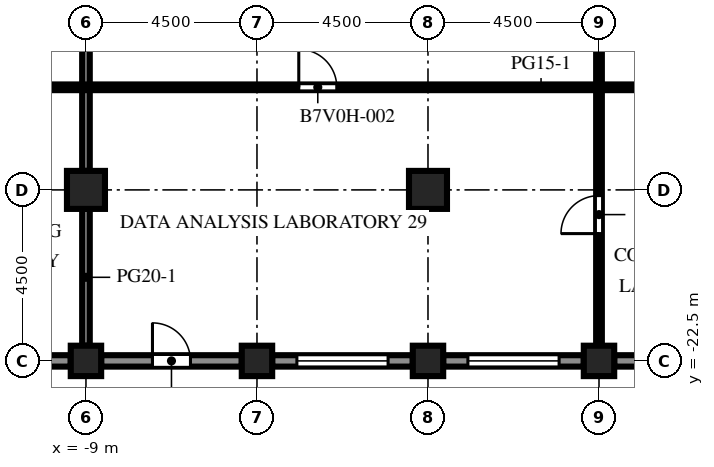
"""IFC4 building model, lengths in metres.
Left out: names, types, materials, properties, quantities, classifications, styles, units other than length and angle.
Written with IfcOpenShell. Run it as: python <this file> out.ifc"""

import sys

from ifc_helpers import new_model, si_unit, direction, frame, frame_2d, origin, origin_2d, place, context, subcontext, project, spatial, rectangle, extrude, element, fill, save


model = new_model("IFC4")
c1 = context("Model", 3, precision=1e-05, world=origin(), true_north=direction((0.0, 1.0)))
c2 = subcontext(c1, "Body", "Model", "MODEL_VIEW")
j1 = project(units=[si_unit("LENGTHUNIT", "METRE"), si_unit("PLANEANGLEUNIT", "RADIAN")], contexts=[c1])
p1 = place(None, origin())
s1 = spatial("IfcSite", under=j1, at=p1, CompositionType="ELEMENT")
p2 = place(p1, origin())
s2 = spatial("IfcBuilding", under=s1, at=p2, CompositionType="ELEMENT")
p3 = place(p2, frame((0.0, 0.0, 231.6)))
s3 = spatial("IfcBuildingStorey", under=s2, at=p3, CompositionType="ELEMENT", Elevation=231.6)
for number, where, z_axis, x_axis in (
    (1, (-9.0, -22.5, 0.0), (0.0, 0.0, 1.0), (1.0, 0.0, 0.0)),
    (2, (-4.5, -22.5, 0.0), (0.0, 0.0, 1.0), (1.0, 0.0, 0.0)),
    (3, (0.0, -22.5, 0.0), (0.0, 0.0, 1.0), (1.0, 0.0, 0.0)),
    (4, (4.5, -22.5, 0.0), (0.0, 0.0, 1.0), (1.0, 0.0, 0.0)),
):
    element("IfcColumn", number, at=place(p3, frame(where, z_axis=z_axis, x_axis=x_axis)), inside=s3, PredefinedType="COLUMN", context=c2, shape_type="SweptSolid", body=[
        extrude(rectangle(XDim=0.8, YDim=0.8, at=origin_2d()), origin(), (0.0, 0.0, 1.0), 4.1),
    ])
for number, where, z_axis, x_axis in (
    (5, (-9.0, -18.0, 0.0), (0.0, 0.0, 1.0), (1.0, 0.0, 0.0)),
    (6, (0.0, -18.0, 0.0), (0.0, 0.0, 1.0), (1.0, 0.0, 0.0)),
):
    element("IfcColumn", number, at=place(p3, frame(where, z_axis=z_axis, x_axis=x_axis)), inside=s3, PredefinedType="COLUMN", context=c2, shape_type="SweptSolid", body=[
        extrude(rectangle(XDim=1.0, YDim=1.0, at=origin_2d()), origin(), (0.0, 0.0, 1.0), 4.1),
    ])
p4 = place(p3, frame((-9.4, -22.5, 0.0), z_axis=(0.0, 0.0, 1.0), x_axis=(-1.0, 0.0, 0.0)))
e7 = element("IfcWall", 7, at=p4, inside=s3, PredefinedType="SOLIDWALL", context=c2, shape_type="SweptSolid", body=[
    extrude(rectangle(XDim=3.7, YDim=0.3, at=frame_2d((1.85, 0.0))), origin(), (0.0, 0.0, 1.0), 2.85),
])
p5 = place(p4, frame((0.65, 0.0, 0.8)))
e8 = element("IfcOpeningElement", 8, at=p5, cuts=e7, PredefinedType="OPENING", context=c2, shape_type="SweptSolid", body=[
    extrude(rectangle(XDim=2.4, YDim=1.7, at=frame_2d((1.2, 0.85))), frame((0.0, 0.16, 0.0), z_axis=(0.0, -1.0, 0.0), x_axis=(1.0, 0.0, 0.0)), (0.0, 0.0, 1.0), 0.32),
])
p6 = place(p3, frame((-4.9, -22.5, 0.0), z_axis=(0.0, 0.0, 1.0), x_axis=(-1.0, 0.0, 0.0)))
e9 = element("IfcWall", 9, at=p6, inside=s3, PredefinedType="SOLIDWALL", context=c2, shape_type="SweptSolid", body=[
    extrude(rectangle(XDim=3.7, YDim=0.3, at=frame_2d((1.85, 0.0))), origin(), (0.0, 0.0, 1.0), 2.85),
])
p7 = place(p6, frame((1.35, 0.0, 0.0)))
e10 = element("IfcOpeningElement", 10, at=p7, cuts=e9, PredefinedType="OPENING", context=c2, shape_type="SweptSolid", body=[
    extrude(rectangle(XDim=1.0, YDim=2.2, at=frame_2d((0.5, 1.1))), frame((0.0, 0.16, 0.0), z_axis=(0.0, -1.0, 0.0), x_axis=(1.0, 0.0, 0.0)), (0.0, 0.0, 1.0), 0.32),
])
p8 = place(p3, frame((-0.4, -22.5, 0.0), z_axis=(0.0, 0.0, 1.0), x_axis=(-1.0, 0.0, 0.0)))
e11 = element("IfcWall", 11, at=p8, inside=s3, PredefinedType="SOLIDWALL", context=c2, shape_type="SweptSolid", body=[
    extrude(rectangle(XDim=3.7, YDim=0.3, at=frame_2d((1.85, 0.0))), origin(), (0.0, 0.0, 1.0), 2.85),
])
p9 = place(p8, frame((0.65, 0.0, 0.8)))
e12 = element("IfcOpeningElement", 12, at=p9, cuts=e11, PredefinedType="OPENING", context=c2, shape_type="SweptSolid", body=[
    extrude(rectangle(XDim=2.4, YDim=1.7, at=frame_2d((1.2, 0.85))), frame((0.0, 0.16, 0.0), z_axis=(0.0, -1.0, 0.0), x_axis=(1.0, 0.0, 0.0)), (0.0, 0.0, 1.0), 0.32),
])
p10 = place(p3, frame((4.1, -22.5, 0.0), z_axis=(0.0, 0.0, 1.0), x_axis=(-1.0, 0.0, 0.0)))
e13 = element("IfcWall", 13, at=p10, inside=s3, PredefinedType="SOLIDWALL", context=c2, shape_type="SweptSolid", body=[
    extrude(rectangle(XDim=3.7, YDim=0.3, at=frame_2d((1.85, 0.0))), origin(), (0.0, 0.0, 1.0), 2.85),
])
p11 = place(p10, frame((0.65, 0.0, 0.8)))
e14 = element("IfcOpeningElement", 14, at=p11, cuts=e13, PredefinedType="OPENING", context=c2, shape_type="SweptSolid", body=[
    extrude(rectangle(XDim=2.4, YDim=1.7, at=frame_2d((1.2, 0.85))), frame((0.0, 0.16, 0.0), z_axis=(0.0, -1.0, 0.0), x_axis=(1.0, 0.0, 0.0)), (0.0, 0.0, 1.0), 0.32),
])
p12 = place(p3, frame((8.6, -22.5, 0.0), z_axis=(0.0, 0.0, 1.0), x_axis=(-1.0, 0.0, 0.0)))
e15 = element("IfcWall", 15, at=p12, inside=s3, PredefinedType="SOLIDWALL", context=c2, shape_type="SweptSolid", body=[
    extrude(rectangle(XDim=3.7, YDim=0.3, at=frame_2d((1.85, 0.0))), origin(), (0.0, 0.0, 1.0), 2.85),
])
p13 = place(p12, frame((0.65, 0.0, 0.8)))
e16 = element("IfcOpeningElement", 16, at=p13, cuts=e15, PredefinedType="OPENING", context=c2, shape_type="SweptSolid", body=[
    extrude(rectangle(XDim=2.4, YDim=1.7, at=frame_2d((1.2, 0.85))), frame((0.0, 0.16, 0.0), z_axis=(0.0, -1.0, 0.0), x_axis=(1.0, 0.0, 0.0)), (0.0, 0.0, 1.0), 0.32),
])
p14 = place(p3, frame((-9.0, -22.1, 0.0), z_axis=(0.0, 0.0, 1.0), x_axis=(0.0, 1.0, 0.0)))
e17 = element("IfcWall", 17, at=p14, inside=s3, PredefinedType="PARTITIONING", context=c2, shape_type="SweptSolid", body=[
    extrude(rectangle(XDim=3.6, YDim=0.2, at=frame_2d((1.8, 0.0))), origin(), (0.0, 0.0, 1.0), 3.65),
])
p15 = place(p3, frame((-9.0, -17.5, 0.0), z_axis=(0.0, 0.0, 1.0), x_axis=(0.0, 1.0, 0.0)))
e18 = element("IfcWall", 18, at=p15, inside=s3, PredefinedType="PARTITIONING", context=c2, shape_type="SweptSolid", body=[
    extrude(rectangle(XDim=8.5, YDim=0.2, at=frame_2d((4.25, 0.0))), origin(), (0.0, 0.0, 1.0), 3.65),
])
p16 = place(p3, frame((4.5, -9.0, 0.0), z_axis=(0.0, 0.0, 1.0), x_axis=(0.0, -1.0, 0.0)))
e19 = element("IfcWall", 19, at=p16, inside=s3, PredefinedType="PARTITIONING", context=c2, shape_type="SweptSolid", body=[
    extrude(rectangle(XDim=13.1, YDim=0.15, at=frame_2d((6.55, 0.0))), origin(), (0.0, 0.0, 1.0), 3.65),
])
p17 = place(p16, frame((9.15, 0.0, 0.0)))
e20 = element("IfcOpeningElement", 20, at=p17, cuts=e19, PredefinedType="OPENING", context=c2, shape_type="SweptSolid", body=[
    extrude(rectangle(XDim=1.0, YDim=2.1, at=frame_2d((0.5, 1.05))), frame((0.0, 0.085, 0.0), z_axis=(0.0, -1.0, 0.0), x_axis=(1.0, 0.0, 0.0)), (0.0, 0.0, 1.0), 0.17),
])
p18 = place(p3, frame((21.0, -15.3, 0.0), z_axis=(0.0, 0.0, 1.0), x_axis=(-1.0, 0.0, 0.0)))
e21 = element("IfcWall", 21, at=p18, inside=s3, PredefinedType="PARTITIONING", context=c2, shape_type="SweptSolid", body=[
    extrude(rectangle(XDim=34.5, YDim=0.15, at=frame_2d((17.25, 0.0))), origin(), (0.0, 0.0, 1.0), 3.65),
])
p19 = place(p18, frame((31.9, 0.0, 0.0)))
e22 = element("IfcOpeningElement", 22, at=p19, cuts=e21, PredefinedType="OPENING", context=c2, shape_type="SweptSolid", body=[
    extrude(rectangle(XDim=1.0, YDim=2.1, at=frame_2d((0.5, 1.05))), frame((0.0, 0.085, 0.0), z_axis=(0.0, -1.0, 0.0), x_axis=(1.0, 0.0, 0.0)), (0.0, 0.0, 1.0), 0.17),
])
p20 = place(p18, frame((23.4, 0.0, 0.0)))
e23 = element("IfcOpeningElement", 23, at=p20, cuts=e21, PredefinedType="OPENING", context=c2, shape_type="SweptSolid", body=[
    extrude(rectangle(XDim=1.0, YDim=2.1, at=frame_2d((0.5, 1.05))), frame((0.0, 0.085, 0.0), z_axis=(0.0, -1.0, 0.0), x_axis=(1.0, 0.0, 0.0)), (0.0, 0.0, 1.0), 0.17),
])
p21 = place(p18, frame((11.65, 0.0, 0.0)))
e24 = element("IfcOpeningElement", 24, at=p21, cuts=e21, PredefinedType="OPENING", context=c2, shape_type="SweptSolid", body=[
    extrude(rectangle(XDim=1.0, YDim=2.1, at=frame_2d((0.5, 1.05))), frame((0.0, 0.085, 0.0), z_axis=(0.0, -1.0, 0.0), x_axis=(1.0, 0.0, 0.0)), (0.0, 0.0, 1.0), 0.17),
])
p22 = place(p18, frame((2.65, 0.0, 0.0)))
e25 = element("IfcOpeningElement", 25, at=p22, cuts=e21, PredefinedType="OPENING", context=c2, shape_type="SweptSolid", body=[
    extrude(rectangle(XDim=1.0, YDim=2.1, at=frame_2d((0.5, 1.05))), frame((0.0, 0.085, 0.0), z_axis=(0.0, -1.0, 0.0), x_axis=(1.0, 0.0, 0.0)), (0.0, 0.0, 1.0), 0.17),
])
p23 = place(p7, origin())
e26 = element("IfcDoor", 26, at=p23, inside=s3, OperationType="SINGLE_SWING_RIGHT", PredefinedType="DOOR", context=c2, shape_type="SweptSolid", body=[
    extrude(rectangle(XDim=1.0, YDim=2.2, at=frame_2d((0.5, 1.1))), frame((0.0, 0.025, 0.0), z_axis=(0.0, -1.0, 0.0), x_axis=(1.0, 0.0, 0.0)), (0.0, 0.0, 1.0), 0.05),
])
fill(e10, e26)
p24 = place(p9, origin())
e27 = element("IfcWindow", 27, at=p24, inside=s3, PartitioningType="SINGLE_PANEL", PredefinedType="WINDOW", context=c2, shape_type="SweptSolid", body=[
    extrude(rectangle(XDim=2.4, YDim=1.7, at=frame_2d((1.2, 0.85))), frame((0.0, 0.03, 0.0), z_axis=(0.0, -1.0, 0.0), x_axis=(1.0, 0.0, 0.0)), (0.0, 0.0, 1.0), 0.06),
])
fill(e12, e27)
p25 = place(p11, origin())
e28 = element("IfcWindow", 28, at=p25, inside=s3, PartitioningType="SINGLE_PANEL", PredefinedType="WINDOW", context=c2, shape_type="SweptSolid", body=[
    extrude(rectangle(XDim=2.4, YDim=1.7, at=frame_2d((1.2, 0.85))), frame((0.0, 0.03, 0.0), z_axis=(0.0, -1.0, 0.0), x_axis=(1.0, 0.0, 0.0)), (0.0, 0.0, 1.0), 0.06),
])
fill(e14, e28)
p26 = place(p20, origin())
e29 = element("IfcDoor", 29, at=p26, inside=s3, OperationType="SINGLE_SWING_RIGHT", PredefinedType="DOOR", context=c2, shape_type="SweptSolid", body=[
    extrude(rectangle(XDim=1.0, YDim=2.1, at=frame_2d((0.5, 1.05))), frame((0.0, 0.025, 0.0), z_axis=(0.0, -1.0, 0.0), x_axis=(1.0, 0.0, 0.0)), (0.0, 0.0, 1.0), 0.05),
])
fill(e23, e29)
p27 = place(p17, origin())
e30 = element("IfcDoor", 30, at=p27, inside=s3, OperationType="SINGLE_SWING_RIGHT", PredefinedType="DOOR", context=c2, shape_type="SweptSolid", body=[
    extrude(rectangle(XDim=1.0, YDim=2.1, at=frame_2d((0.5, 1.05))), frame((0.0, 0.025, 0.0), z_axis=(0.0, -1.0, 0.0), x_axis=(1.0, 0.0, 0.0)), (0.0, 0.0, 1.0), 0.05),
])
fill(e20, e30)
save(model, sys.argv[1])
